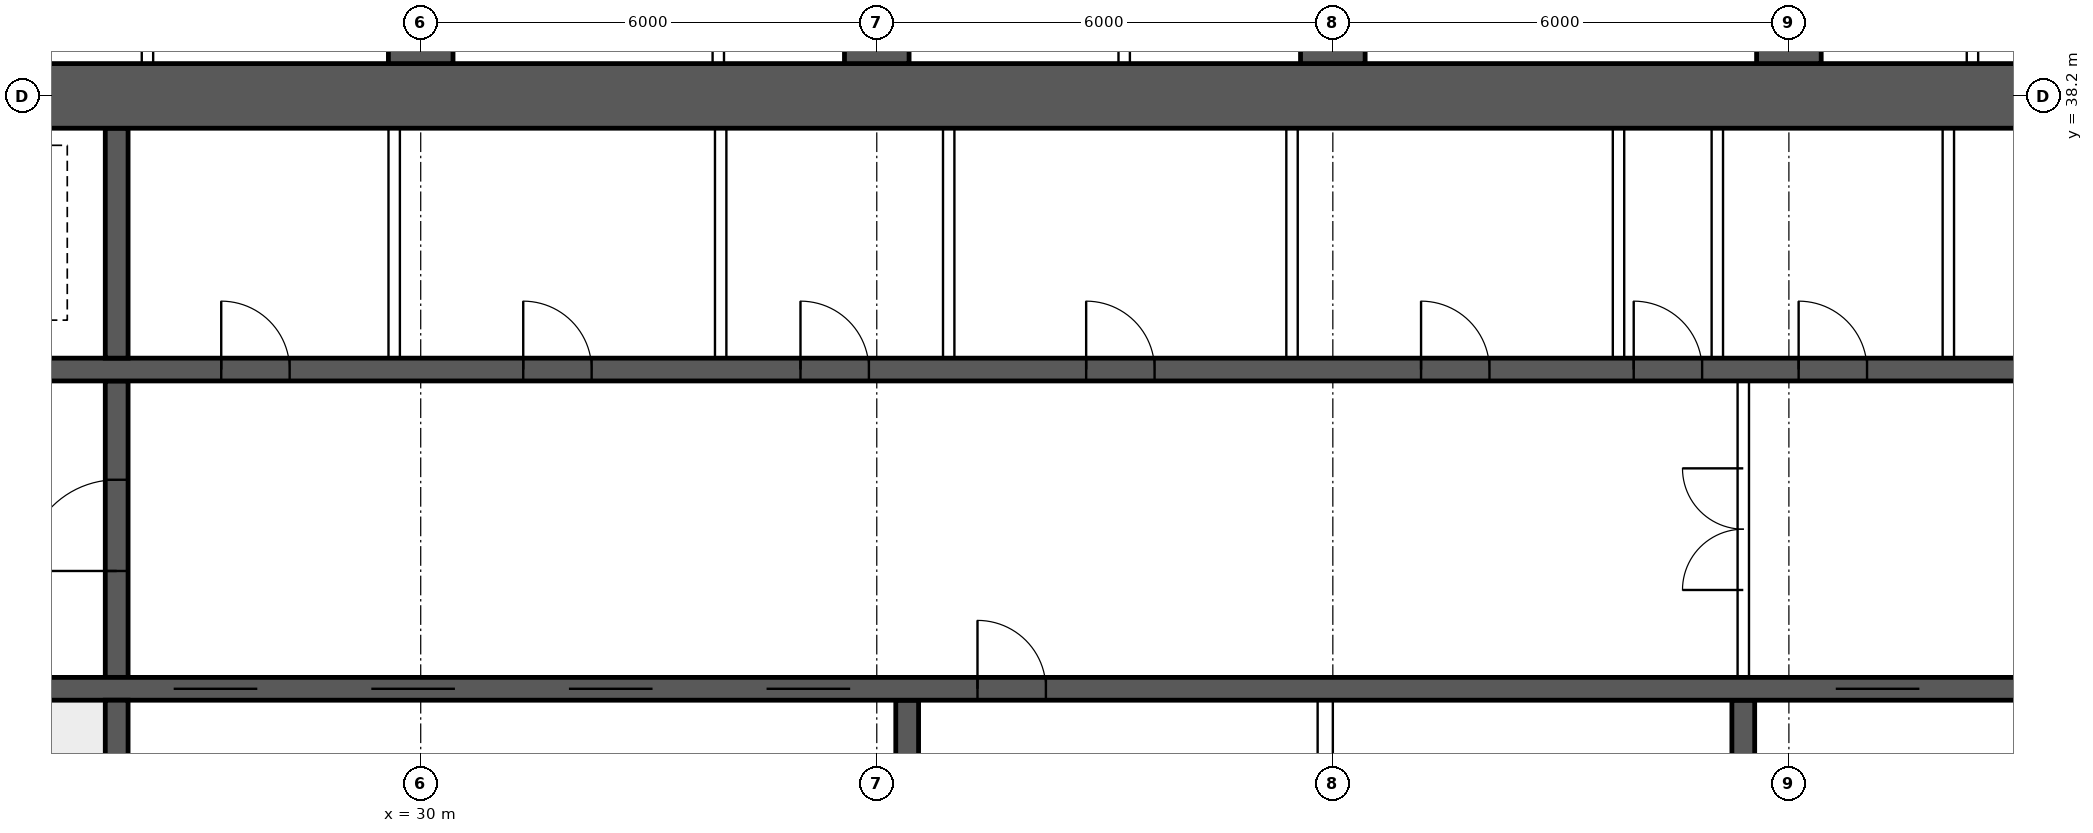
"""IFC4 building model, lengths in metres.
Left out: names, types, materials, properties, quantities, classifications, styles, units other than length and angle.
Written with IfcOpenShell. Run it as: python <this file> out.ifc"""

import sys

from ifc_helpers import new_model, si_unit, direction, frame, frame_2d, origin, place, context, subcontext, project, spatial, rectangle, extrude, element, fill, save


model = new_model("IFC4")
c1 = context("Model", 3, precision=1e-05, world=origin(), true_north=direction((0.0, 1.0)))
c2 = subcontext(c1, "Body", "Model", "MODEL_VIEW")
j1 = project(units=[si_unit("LENGTHUNIT", "METRE"), si_unit("PLANEANGLEUNIT", "RADIAN")], contexts=[c1])
p1 = place(None, origin())
s1 = spatial("IfcSite", under=j1, at=p1, CompositionType="ELEMENT")
p2 = place(p1, origin())
s2 = spatial("IfcBuilding", under=s1, at=p2, CompositionType="ELEMENT")
p3 = place(p2, frame((0.0, 0.0, 148.6)))
s3 = spatial("IfcBuildingStorey", under=s2, at=p3, CompositionType="ELEMENT", Elevation=148.6)
p4 = place(p3, frame((18.0, 38.2, 0.0), z_axis=(0.0, 0.0, 1.0), x_axis=(1.0, 0.0, 0.0)))
e1 = element("IfcWall", 1, at=p4, inside=s3, PredefinedType="SHEAR", context=c2, shape_type="SweptSolid", body=[
    extrude(rectangle(XDim=48.0, YDim=0.85, at=frame_2d((24.0, 0.0))), origin(), (0.0, 0.0, 1.0), 3.75),
])
p5 = place(p3, frame((18.425, 30.4, 0.0), z_axis=(0.0, 0.0, 1.0), x_axis=(1.0, 0.0, 0.0)))
e2 = element("IfcWall", 2, at=p5, inside=s3, PredefinedType="SHEAR", context=c2, shape_type="SweptSolid", body=[
    extrude(rectangle(XDim=47.15, YDim=0.3, at=frame_2d((23.575, 0.0))), origin(), (0.0, 0.0, 1.0), 3.75),
])
p6 = place(p5, frame((0.4, 0.0, 0.0)))
e3 = element("IfcOpeningElement", 3, at=p6, cuts=e2, PredefinedType="OPENING", context=c2, shape_type="SweptSolid", body=[
    extrude(rectangle(XDim=1.0, YDim=2.1, at=frame_2d((0.5, 1.05))), frame((0.0, 0.16, 0.0), z_axis=(0.0, -1.0, 0.0), x_axis=(1.0, 0.0, 0.0)), (0.0, 0.0, 1.0), 0.32),
])
p7 = place(p5, frame((45.75, 0.0, 0.0)))
e4 = element("IfcOpeningElement", 4, at=p7, cuts=e2, PredefinedType="OPENING", context=c2, shape_type="SweptSolid", body=[
    extrude(rectangle(XDim=1.0, YDim=2.1, at=frame_2d((0.5, 1.05))), frame((0.0, 0.16, 0.0), z_axis=(0.0, -1.0, 0.0), x_axis=(1.0, 0.0, 0.0)), (0.0, 0.0, 1.0), 0.32),
])
p8 = place(p5, frame((8.325, 0.0, 0.0)))
e5 = element("IfcOpeningElement", 5, at=p8, cuts=e2, PredefinedType="OPENING", context=c2, shape_type="SweptSolid", body=[
    extrude(rectangle(XDim=1.1, YDim=2.1, at=frame_2d((0.55, 1.05))), frame((0.0, 0.16, 0.0), z_axis=(0.0, -1.0, 0.0), x_axis=(1.0, 0.0, 0.0)), (0.0, 0.0, 1.0), 0.32),
])
p9 = place(p5, frame((10.925, 0.0, 0.0)))
e6 = element("IfcOpeningElement", 6, at=p9, cuts=e2, PredefinedType="OPENING", context=c2, shape_type="SweptSolid", body=[
    extrude(rectangle(XDim=1.1, YDim=2.1, at=frame_2d((0.55, 1.05))), frame((0.0, 0.16, 0.0), z_axis=(0.0, -1.0, 0.0), x_axis=(1.0, 0.0, 0.0)), (0.0, 0.0, 1.0), 0.32),
])
p10 = place(p5, frame((13.525, 0.0, 0.0)))
e7 = element("IfcOpeningElement", 7, at=p10, cuts=e2, PredefinedType="OPENING", context=c2, shape_type="SweptSolid", body=[
    extrude(rectangle(XDim=1.1, YDim=2.1, at=frame_2d((0.55, 1.05))), frame((0.0, 0.16, 0.0), z_axis=(0.0, -1.0, 0.0), x_axis=(1.0, 0.0, 0.0)), (0.0, 0.0, 1.0), 0.32),
])
p11 = place(p5, frame((16.125, 0.0, 0.0)))
e8 = element("IfcOpeningElement", 8, at=p11, cuts=e2, PredefinedType="OPENING", context=c2, shape_type="SweptSolid", body=[
    extrude(rectangle(XDim=1.1, YDim=2.1, at=frame_2d((0.55, 1.05))), frame((0.0, 0.16, 0.0), z_axis=(0.0, -1.0, 0.0), x_axis=(1.0, 0.0, 0.0)), (0.0, 0.0, 1.0), 0.32),
])
p12 = place(p5, frame((18.9, 0.0, 0.0)))
e9 = element("IfcOpeningElement", 9, at=p12, cuts=e2, PredefinedType="OPENING", context=c2, shape_type="SweptSolid", body=[
    extrude(rectangle(XDim=0.9, YDim=2.1, at=frame_2d((0.45, 1.05))), frame((0.0, 0.16, 0.0), z_axis=(0.0, -1.0, 0.0), x_axis=(1.0, 0.0, 0.0)), (0.0, 0.0, 1.0), 0.32),
])
p13 = place(p5, frame((30.192, 0.0, 0.0)))
e10 = element("IfcOpeningElement", 10, at=p13, cuts=e2, PredefinedType="OPENING", context=c2, shape_type="SweptSolid", body=[
    extrude(rectangle(XDim=1.1, YDim=2.1, at=frame_2d((0.55, 1.05))), frame((0.0, 0.16, 0.0), z_axis=(0.0, -1.0, 0.0), x_axis=(1.0, 0.0, 0.0)), (0.0, 0.0, 1.0), 0.32),
])
p14 = place(p5, frame((33.725, 0.0, 0.0)))
e11 = element("IfcOpeningElement", 11, at=p14, cuts=e2, PredefinedType="OPENING", context=c2, shape_type="SweptSolid", body=[
    extrude(rectangle(XDim=1.1, YDim=2.1, at=frame_2d((0.55, 1.05))), frame((0.0, 0.16, 0.0), z_axis=(0.0, -1.0, 0.0), x_axis=(1.0, 0.0, 0.0)), (0.0, 0.0, 1.0), 0.32),
])
p15 = place(p5, frame((37.258, 0.0, 0.0)))
e12 = element("IfcOpeningElement", 12, at=p15, cuts=e2, PredefinedType="OPENING", context=c2, shape_type="SweptSolid", body=[
    extrude(rectangle(XDim=1.1, YDim=2.1, at=frame_2d((0.55, 1.05))), frame((0.0, 0.16, 0.0), z_axis=(0.0, -1.0, 0.0), x_axis=(1.0, 0.0, 0.0)), (0.0, 0.0, 1.0), 0.32),
])
p16 = place(p3, frame((18.425, 34.6, 0.0), z_axis=(0.0, 0.0, 1.0), x_axis=(1.0, 0.0, 0.0)))
e13 = element("IfcWall", 13, at=p16, inside=s3, PredefinedType="SHEAR", context=c2, shape_type="SweptSolid", body=[
    extrude(rectangle(XDim=47.15, YDim=0.3, at=frame_2d((23.575, 0.0))), origin(), (0.0, 0.0, 1.0), 3.75),
])
p17 = place(p16, frame((0.9, 0.0, 0.0)))
e14 = element("IfcOpeningElement", 14, at=p17, cuts=e13, PredefinedType="OPENING", context=c2, shape_type="SweptSolid", body=[
    extrude(rectangle(XDim=1.1, YDim=2.1, at=frame_2d((0.55, 1.05))), frame((0.0, 0.16, 0.0), z_axis=(0.0, -1.0, 0.0), x_axis=(1.0, 0.0, 0.0)), (0.0, 0.0, 1.0), 0.32),
])
p18 = place(p16, frame((45.15, 0.0, 0.0)))
e15 = element("IfcOpeningElement", 15, at=p18, cuts=e13, PredefinedType="OPENING", context=c2, shape_type="SweptSolid", body=[
    extrude(rectangle(XDim=1.1, YDim=2.1, at=frame_2d((0.55, 1.05))), frame((0.0, 0.16, 0.0), z_axis=(0.0, -1.0, 0.0), x_axis=(1.0, 0.0, 0.0)), (0.0, 0.0, 1.0), 0.32),
])
p19 = place(p16, frame((4.175, 0.0, 0.0)))
e16 = element("IfcOpeningElement", 16, at=p19, cuts=e13, PredefinedType="OPENING", context=c2, shape_type="SweptSolid", body=[
    extrude(rectangle(XDim=0.9, YDim=2.1, at=frame_2d((0.45, 1.05))), frame((0.0, 0.16, 0.0), z_axis=(0.0, -1.0, 0.0), x_axis=(1.0, 0.0, 0.0)), (0.0, 0.0, 1.0), 0.32),
])
p20 = place(p16, frame((42.075, 0.0, 0.0)))
e17 = element("IfcOpeningElement", 17, at=p20, cuts=e13, PredefinedType="OPENING", context=c2, shape_type="SweptSolid", body=[
    extrude(rectangle(XDim=0.9, YDim=2.1, at=frame_2d((0.45, 1.05))), frame((0.0, 0.16, 0.0), z_axis=(0.0, -1.0, 0.0), x_axis=(1.0, 0.0, 0.0)), (0.0, 0.0, 1.0), 0.32),
])
p21 = place(p16, frame((8.95, 0.0, 0.0)))
e18 = element("IfcOpeningElement", 18, at=p21, cuts=e13, PredefinedType="OPENING", context=c2, shape_type="SweptSolid", body=[
    extrude(rectangle(XDim=0.9, YDim=2.1, at=frame_2d((0.45, 1.05))), frame((0.0, 0.16, 0.0), z_axis=(0.0, -1.0, 0.0), x_axis=(1.0, 0.0, 0.0)), (0.0, 0.0, 1.0), 0.32),
])
p22 = place(p16, frame((12.924, 0.0, 0.0)))
e19 = element("IfcOpeningElement", 19, at=p22, cuts=e13, PredefinedType="OPENING", context=c2, shape_type="SweptSolid", body=[
    extrude(rectangle(XDim=0.9, YDim=2.1, at=frame_2d((0.45, 1.05))), frame((0.0, 0.16, 0.0), z_axis=(0.0, -1.0, 0.0), x_axis=(1.0, 0.0, 0.0)), (0.0, 0.0, 1.0), 0.32),
])
p23 = place(p16, frame((16.571, 0.0, 0.0)))
e20 = element("IfcOpeningElement", 20, at=p23, cuts=e13, PredefinedType="OPENING", context=c2, shape_type="SweptSolid", body=[
    extrude(rectangle(XDim=0.9, YDim=2.1, at=frame_2d((0.45, 1.05))), frame((0.0, 0.16, 0.0), z_axis=(0.0, -1.0, 0.0), x_axis=(1.0, 0.0, 0.0)), (0.0, 0.0, 1.0), 0.32),
])
p24 = place(p16, frame((20.33, 0.0, 0.0)))
e21 = element("IfcOpeningElement", 21, at=p24, cuts=e13, PredefinedType="OPENING", context=c2, shape_type="SweptSolid", body=[
    extrude(rectangle(XDim=0.9, YDim=2.1, at=frame_2d((0.45, 1.05))), frame((0.0, 0.16, 0.0), z_axis=(0.0, -1.0, 0.0), x_axis=(1.0, 0.0, 0.0)), (0.0, 0.0, 1.0), 0.32),
])
p25 = place(p16, frame((24.736, 0.0, 0.0)))
e22 = element("IfcOpeningElement", 22, at=p25, cuts=e13, PredefinedType="OPENING", context=c2, shape_type="SweptSolid", body=[
    extrude(rectangle(XDim=0.9, YDim=2.1, at=frame_2d((0.45, 1.05))), frame((0.0, 0.16, 0.0), z_axis=(0.0, -1.0, 0.0), x_axis=(1.0, 0.0, 0.0)), (0.0, 0.0, 1.0), 0.32),
])
p26 = place(p16, frame((27.533, 0.0, 0.0)))
e23 = element("IfcOpeningElement", 23, at=p26, cuts=e13, PredefinedType="OPENING", context=c2, shape_type="SweptSolid", body=[
    extrude(rectangle(XDim=0.9, YDim=2.1, at=frame_2d((0.45, 1.05))), frame((0.0, 0.16, 0.0), z_axis=(0.0, -1.0, 0.0), x_axis=(1.0, 0.0, 0.0)), (0.0, 0.0, 1.0), 0.32),
])
p27 = place(p16, frame((29.703, 0.0, 0.0)))
e24 = element("IfcOpeningElement", 24, at=p27, cuts=e13, PredefinedType="OPENING", context=c2, shape_type="SweptSolid", body=[
    extrude(rectangle(XDim=0.9, YDim=2.1, at=frame_2d((0.45, 1.05))), frame((0.0, 0.16, 0.0), z_axis=(0.0, -1.0, 0.0), x_axis=(1.0, 0.0, 0.0)), (0.0, 0.0, 1.0), 0.32),
])
p28 = place(p16, frame((33.502, 0.0, 0.0)))
e25 = element("IfcOpeningElement", 25, at=p28, cuts=e13, PredefinedType="OPENING", context=c2, shape_type="SweptSolid", body=[
    extrude(rectangle(XDim=0.9, YDim=2.1, at=frame_2d((0.45, 1.05))), frame((0.0, 0.16, 0.0), z_axis=(0.0, -1.0, 0.0), x_axis=(1.0, 0.0, 0.0)), (0.0, 0.0, 1.0), 0.32),
])
p29 = place(p16, frame((37.453, 0.0, 0.0)))
e26 = element("IfcOpeningElement", 26, at=p29, cuts=e13, PredefinedType="OPENING", context=c2, shape_type="SweptSolid", body=[
    extrude(rectangle(XDim=0.9, YDim=2.1, at=frame_2d((0.45, 1.05))), frame((0.0, 0.16, 0.0), z_axis=(0.0, -1.0, 0.0), x_axis=(1.0, 0.0, 0.0)), (0.0, 0.0, 1.0), 0.32),
])
p30 = place(p3, frame((26.0, 26.225, 0.0), z_axis=(0.0, 0.0, 1.0), x_axis=(0.0, 1.0, 0.0)))
e27 = element("IfcWall", 27, at=p30, inside=s3, PredefinedType="SHEAR", context=c2, shape_type="SweptSolid", body=[
    extrude(rectangle(XDim=4.025, YDim=0.3, at=frame_2d((2.012, 0.0))), origin(), (0.0, 0.0, 1.0), 3.75),
])
p31 = place(p3, frame((26.0, 30.55, 0.0), z_axis=(0.0, 0.0, 1.0), x_axis=(0.0, 1.0, 0.0)))
e28 = element("IfcWall", 28, at=p31, inside=s3, PredefinedType="SHEAR", context=c2, shape_type="SweptSolid", body=[
    extrude(rectangle(XDim=3.9, YDim=0.3, at=frame_2d((1.95, 0.0))), origin(), (0.0, 0.0, 1.0), 3.75),
])
p32 = place(p31, frame((1.4, 0.0, 0.0)))
e29 = element("IfcOpeningElement", 29, at=p32, cuts=e28, PredefinedType="OPENING", context=c2, shape_type="SweptSolid", body=[
    extrude(rectangle(XDim=1.2, YDim=2.1, at=frame_2d((0.6, 1.05))), frame((0.0, 0.16, 0.0), z_axis=(0.0, -1.0, 0.0), x_axis=(1.0, 0.0, 0.0)), (0.0, 0.0, 1.0), 0.32),
])
p33 = place(p3, frame((26.0, 34.75, 0.0), z_axis=(0.0, 0.0, 1.0), x_axis=(0.0, 1.0, 0.0)))
e30 = element("IfcWall", 30, at=p33, inside=s3, PredefinedType="SHEAR", context=c2, shape_type="SweptSolid", body=[
    extrude(rectangle(XDim=3.025, YDim=0.3, at=frame_2d((1.512, 0.0))), origin(), (0.0, 0.0, 1.0), 3.75),
])
for number, where, z_axis, x_axis in (
    (31, (36.4, 26.225, 0.0), (0.0, 0.0, 1.0), (0.0, 1.0, 0.0)),
    (32, (47.4, 26.225, 0.0), (0.0, 0.0, 1.0), (0.0, 1.0, 0.0)),
):
    element("IfcWall", number, at=place(p3, frame(where, z_axis=z_axis, x_axis=x_axis)), inside=s3, PredefinedType="SHEAR", context=c2, shape_type="SweptSolid", body=[
        extrude(rectangle(XDim=4.025, YDim=0.3, at=frame_2d((2.012, 0.0))), origin(), (0.0, 0.0, 1.0), 3.75),
    ])
for number, where, z_axis, x_axis in (
    (33, (30.0, 38.625, 0.0), (0.0, 0.0, 1.0), (0.0, 1.0, 0.0)),
    (34, (36.0, 38.625, 0.0), (0.0, 0.0, 1.0), (0.0, 1.0, 0.0)),
    (35, (42.0, 38.625, 0.0), (0.0, 0.0, 1.0), (0.0, 1.0, 0.0)),
    (36, (48.0, 38.625, 0.0), (0.0, 0.0, 1.0), (0.0, 1.0, 0.0)),
):
    element("IfcWall", number, at=place(p3, frame(where, z_axis=z_axis, x_axis=x_axis)), inside=s3, PredefinedType="SHEAR", context=c2, shape_type="SweptSolid", body=[
        extrude(rectangle(XDim=8.175, YDim=0.85, at=frame_2d((4.087, 0.0))), origin(), (0.0, 0.0, 1.0), 3.75),
    ])
p34 = place(p3, frame((47.4, 30.55, 0.0), z_axis=(0.0, 0.0, 1.0), x_axis=(0.0, 1.0, 0.0)))
e37 = element("IfcWall", 37, at=p34, inside=s3, PredefinedType="SOLIDWALL", context=c2, shape_type="SweptSolid", body=[
    extrude(rectangle(XDim=3.9, YDim=0.15, at=frame_2d((1.95, 0.0))), origin(), (0.0, 0.0, 1.0), 3.5),
])
p35 = place(p34, frame((1.15, 0.0, 0.0)))
e38 = element("IfcOpeningElement", 38, at=p35, cuts=e37, PredefinedType="OPENING", context=c2, shape_type="SweptSolid", body=[
    extrude(rectangle(XDim=1.6, YDim=2.1, at=frame_2d((0.8, 1.05))), frame((0.0, 0.085, 0.0), z_axis=(0.0, -1.0, 0.0), x_axis=(1.0, 0.0, 0.0)), (0.0, 0.0, 1.0), 0.17),
])
for number, where, z_axis, x_axis in (
    (39, (29.651, 34.75, 0.0), (0.0, 0.0, 1.0), (0.0, 1.0, 0.0)),
    (40, (33.946, 34.75, 0.0), (0.0, 0.0, 1.0), (0.0, 1.0, 0.0)),
    (41, (36.946, 34.75, 0.0), (0.0, 0.0, 1.0), (0.0, 1.0, 0.0)),
    (42, (41.463, 34.75, 0.0), (0.0, 0.0, 1.0), (0.0, 1.0, 0.0)),
    (43, (45.758, 34.75, 0.0), (0.0, 0.0, 1.0), (0.0, 1.0, 0.0)),
    (44, (47.058, 34.75, 0.0), (0.0, 0.0, 1.0), (0.0, 1.0, 0.0)),
    (45, (50.098, 34.75, 0.0), (0.0, 0.0, 1.0), (0.0, 1.0, 0.0)),
):
    element("IfcWall", number, at=place(p3, frame(where, z_axis=z_axis, x_axis=x_axis)), inside=s3, PredefinedType="SOLIDWALL", context=c2, shape_type="SweptSolid", body=[
        extrude(rectangle(XDim=3.025, YDim=0.15, at=frame_2d((1.512, 0.0))), origin(), (0.0, 0.0, 1.0), 3.5),
    ])
p36 = place(p3, frame((41.9, 26.225, 0.0), z_axis=(0.0, 0.0, 1.0), x_axis=(0.0, 1.0, 0.0)))
e46 = element("IfcWall", 46, at=p36, inside=s3, PredefinedType="SOLIDWALL", context=c2, shape_type="SweptSolid", body=[
    extrude(rectangle(XDim=4.025, YDim=0.2, at=frame_2d((2.012, 0.0))), origin(), (0.0, 0.0, 1.0), 3.5),
])
for number, where, z_axis, x_axis in (
    (47, (26.405, 38.625, 0.0), (0.0, 0.0, 1.0), (0.0, 1.0, 0.0)),
    (48, (33.915, 38.625, 0.0), (0.0, 0.0, 1.0), (0.0, 1.0, 0.0)),
    (49, (39.255, 38.625, 0.0), (0.0, 0.0, 1.0), (0.0, 1.0, 0.0)),
    (50, (50.415, 38.625, 0.0), (0.0, 0.0, 1.0), (0.0, 1.0, 0.0)),
):
    element("IfcWall", number, at=place(p3, frame(where, z_axis=z_axis, x_axis=x_axis)), inside=s3, PredefinedType="PARTITIONING", context=c2, shape_type="SweptSolid", body=[
        extrude(rectangle(XDim=8.075, YDim=0.15, at=frame_2d((4.038, 0.0))), origin(), (0.0, 0.0, 1.0), 3.5),
    ])
p37 = place(p35, origin())
e51 = element("IfcDoor", 51, at=p37, inside=s3, OperationType="DOUBLE_DOOR_SINGLE_SWING", PredefinedType="DOOR", context=c2, shape_type="SweptSolid", body=[
    extrude(rectangle(XDim=1.6, YDim=2.1, at=frame_2d((0.8, 1.05))), frame((0.0, 0.025, 0.0), z_axis=(0.0, -1.0, 0.0), x_axis=(1.0, 0.0, 0.0)), (0.0, 0.0, 1.0), 0.05),
])
fill(e38, e51)
p38 = place(p32, origin())
e52 = element("IfcDoor", 52, at=p38, inside=s3, OperationType="SINGLE_SWING_LEFT", PredefinedType="DOOR", context=c2, shape_type="SweptSolid", body=[
    extrude(rectangle(XDim=1.2, YDim=2.1, at=frame_2d((0.6, 1.05))), frame((0.0, 0.025, 0.0), z_axis=(0.0, -1.0, 0.0), x_axis=(1.0, 0.0, 0.0)), (0.0, 0.0, 1.0), 0.05),
])
fill(e29, e52)
p39 = place(p21, origin())
e53 = element("IfcDoor", 53, at=p39, inside=s3, OperationType="SINGLE_SWING_LEFT", PredefinedType="DOOR", context=c2, shape_type="SweptSolid", body=[
    extrude(rectangle(XDim=0.9, YDim=2.1, at=frame_2d((0.45, 1.05))), frame((0.0, 0.025, 0.0), z_axis=(0.0, -1.0, 0.0), x_axis=(1.0, 0.0, 0.0)), (0.0, 0.0, 1.0), 0.05),
])
fill(e18, e53)
p40 = place(p22, origin())
e54 = element("IfcDoor", 54, at=p40, inside=s3, OperationType="SINGLE_SWING_LEFT", PredefinedType="DOOR", context=c2, shape_type="SweptSolid", body=[
    extrude(rectangle(XDim=0.9, YDim=2.1, at=frame_2d((0.45, 1.05))), frame((0.0, 0.025, 0.0), z_axis=(0.0, -1.0, 0.0), x_axis=(1.0, 0.0, 0.0)), (0.0, 0.0, 1.0), 0.05),
])
fill(e19, e54)
p41 = place(p23, origin())
e55 = element("IfcDoor", 55, at=p41, inside=s3, OperationType="SINGLE_SWING_LEFT", PredefinedType="DOOR", context=c2, shape_type="SweptSolid", body=[
    extrude(rectangle(XDim=0.9, YDim=2.1, at=frame_2d((0.45, 1.05))), frame((0.0, 0.025, 0.0), z_axis=(0.0, -1.0, 0.0), x_axis=(1.0, 0.0, 0.0)), (0.0, 0.0, 1.0), 0.05),
])
fill(e20, e55)
p42 = place(p24, origin())
e56 = element("IfcDoor", 56, at=p42, inside=s3, OperationType="SINGLE_SWING_LEFT", PredefinedType="DOOR", context=c2, shape_type="SweptSolid", body=[
    extrude(rectangle(XDim=0.9, YDim=2.1, at=frame_2d((0.45, 1.05))), frame((0.0, 0.025, 0.0), z_axis=(0.0, -1.0, 0.0), x_axis=(1.0, 0.0, 0.0)), (0.0, 0.0, 1.0), 0.05),
])
fill(e21, e56)
p43 = place(p25, origin())
e57 = element("IfcDoor", 57, at=p43, inside=s3, OperationType="SINGLE_SWING_LEFT", PredefinedType="DOOR", context=c2, shape_type="SweptSolid", body=[
    extrude(rectangle(XDim=0.9, YDim=2.1, at=frame_2d((0.45, 1.05))), frame((0.0, 0.025, 0.0), z_axis=(0.0, -1.0, 0.0), x_axis=(1.0, 0.0, 0.0)), (0.0, 0.0, 1.0), 0.05),
])
fill(e22, e57)
p44 = place(p26, origin())
e58 = element("IfcDoor", 58, at=p44, inside=s3, OperationType="SINGLE_SWING_LEFT", PredefinedType="DOOR", context=c2, shape_type="SweptSolid", body=[
    extrude(rectangle(XDim=0.9, YDim=2.1, at=frame_2d((0.45, 1.05))), frame((0.0, 0.025, 0.0), z_axis=(0.0, -1.0, 0.0), x_axis=(1.0, 0.0, 0.0)), (0.0, 0.0, 1.0), 0.05),
])
fill(e23, e58)
p45 = place(p27, origin())
e59 = element("IfcDoor", 59, at=p45, inside=s3, OperationType="SINGLE_SWING_LEFT", PredefinedType="DOOR", context=c2, shape_type="SweptSolid", body=[
    extrude(rectangle(XDim=0.9, YDim=2.1, at=frame_2d((0.45, 1.05))), frame((0.0, 0.025, 0.0), z_axis=(0.0, -1.0, 0.0), x_axis=(1.0, 0.0, 0.0)), (0.0, 0.0, 1.0), 0.05),
])
fill(e24, e59)
p46 = place(p8, origin())
e60 = element("IfcDoor", 60, at=p46, inside=s3, OperationType="DOUBLE_DOOR_SLIDING", PredefinedType="DOOR", context=c2, shape_type="SweptSolid", body=[
    extrude(rectangle(XDim=1.1, YDim=2.1, at=frame_2d((0.55, 1.05))), frame((0.0, 0.025, 0.0), z_axis=(0.0, -1.0, 0.0), x_axis=(1.0, 0.0, 0.0)), (0.0, 0.0, 1.0), 0.05),
])
fill(e5, e60)
p47 = place(p9, origin())
e61 = element("IfcDoor", 61, at=p47, inside=s3, OperationType="DOUBLE_DOOR_SLIDING", PredefinedType="DOOR", context=c2, shape_type="SweptSolid", body=[
    extrude(rectangle(XDim=1.1, YDim=2.1, at=frame_2d((0.55, 1.05))), frame((0.0, 0.025, 0.0), z_axis=(0.0, -1.0, 0.0), x_axis=(1.0, 0.0, 0.0)), (0.0, 0.0, 1.0), 0.05),
])
fill(e6, e61)
p48 = place(p10, origin())
e62 = element("IfcDoor", 62, at=p48, inside=s3, OperationType="DOUBLE_DOOR_SLIDING", PredefinedType="DOOR", context=c2, shape_type="SweptSolid", body=[
    extrude(rectangle(XDim=1.1, YDim=2.1, at=frame_2d((0.55, 1.05))), frame((0.0, 0.025, 0.0), z_axis=(0.0, -1.0, 0.0), x_axis=(1.0, 0.0, 0.0)), (0.0, 0.0, 1.0), 0.05),
])
fill(e7, e62)
p49 = place(p11, origin())
e63 = element("IfcDoor", 63, at=p49, inside=s3, OperationType="DOUBLE_DOOR_SLIDING", PredefinedType="DOOR", context=c2, shape_type="SweptSolid", body=[
    extrude(rectangle(XDim=1.1, YDim=2.1, at=frame_2d((0.55, 1.05))), frame((0.0, 0.025, 0.0), z_axis=(0.0, -1.0, 0.0), x_axis=(1.0, 0.0, 0.0)), (0.0, 0.0, 1.0), 0.05),
])
fill(e8, e63)
p50 = place(p12, origin())
e64 = element("IfcDoor", 64, at=p50, inside=s3, OperationType="SINGLE_SWING_LEFT", PredefinedType="DOOR", context=c2, shape_type="SweptSolid", body=[
    extrude(rectangle(XDim=0.9, YDim=2.1, at=frame_2d((0.45, 1.05))), frame((0.0, 0.025, 0.0), z_axis=(0.0, -1.0, 0.0), x_axis=(1.0, 0.0, 0.0)), (0.0, 0.0, 1.0), 0.05),
])
fill(e9, e64)
p51 = place(p13, origin())
e65 = element("IfcDoor", 65, at=p51, inside=s3, OperationType="DOUBLE_DOOR_SLIDING", PredefinedType="DOOR", context=c2, shape_type="SweptSolid", body=[
    extrude(rectangle(XDim=1.1, YDim=2.1, at=frame_2d((0.55, 1.05))), frame((0.0, 0.025, 0.0), z_axis=(0.0, -1.0, 0.0), x_axis=(1.0, 0.0, 0.0)), (0.0, 0.0, 1.0), 0.05),
])
fill(e10, e65)
save(model, sys.argv[1])
